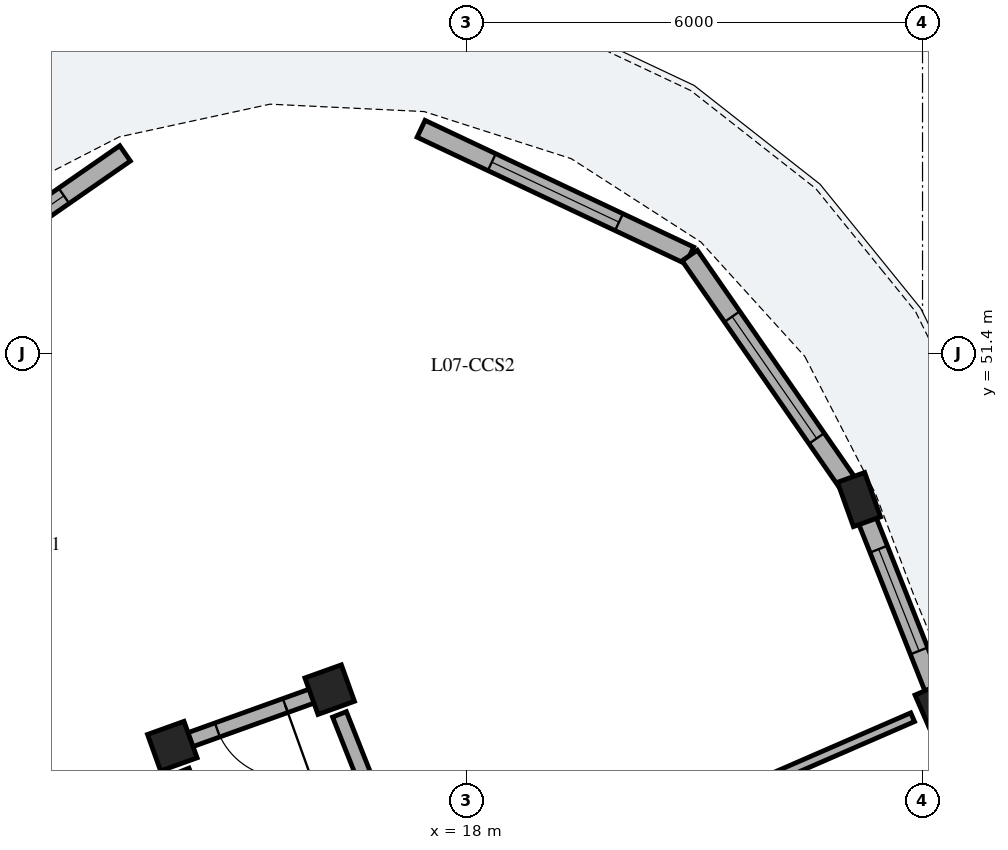
"""IFC4 building model, lengths in metres.
Left out: names, types, materials, properties, quantities, classifications, styles, units other than length and angle.
Written with IfcOpenShell. Run it as: python <this file> out.ifc"""

import sys

from ifc_helpers import new_model, si_unit, direction, frame, frame_2d, origin, origin_2d, place, context, subcontext, project, spatial, rectangle, extrude, element, fill, save


model = new_model("IFC4")
c1 = context("Model", 3, precision=1e-05, world=origin(), true_north=direction((0.0, 1.0)))
c2 = subcontext(c1, "Body", "Model", "MODEL_VIEW")
j1 = project(units=[si_unit("LENGTHUNIT", "METRE"), si_unit("PLANEANGLEUNIT", "RADIAN")], contexts=[c1])
p1 = place(None, origin())
s1 = spatial("IfcSite", under=j1, at=p1, CompositionType="ELEMENT")
p2 = place(p1, origin())
s2 = spatial("IfcBuilding", under=s1, at=p2, CompositionType="ELEMENT")
p3 = place(p2, frame((0.0, 0.0, 25.64)))
s3 = spatial("IfcBuildingStorey", under=s2, at=p3, CompositionType="ELEMENT", Elevation=25.64)
p4 = place(p3, frame((23.165, 49.479, 0.0), z_axis=(0.0, 0.0, 1.0), x_axis=(-0.941176015256, -0.337916718003, 0.0)))
e1 = element("IfcColumn", 1, at=p4, inside=s3, PredefinedType="PILASTER", context=c2, shape_type="SweptSolid", body=[
    extrude(rectangle(XDim=0.38, YDim=0.62, at=origin_2d()), origin(), (0.0, 0.0, 1.0), 3.11),
])
for number, where, z_axis, x_axis in (
    (2, (16.2, 46.979, 0.0), (0.0, 0.0, 1.0), (-0.941, -0.338, 0.0)),
    (3, (14.129, 46.236, 0.0), (0.0, 0.0, 1.0), (-0.941, -0.338, 0.0)),
    (4, (24.237, 46.776, 0.0), (0.0, 0.0, 1.0), (-0.917, -0.399, 0.0)),
):
    element("IfcColumn", number, at=place(p3, frame(where, z_axis=z_axis, x_axis=x_axis)), inside=s3, PredefinedType="COLUMN", context=c2, shape_type="SweptSolid", body=[
        extrude(rectangle(XDim=0.51, YDim=0.51, at=origin_2d()), origin(), (0.0, 0.0, 1.0), 3.11),
    ])
p5 = place(p3, frame((23.224, 49.331, 0.0), z_axis=(0.0, 0.0, 1.0), x_axis=(0.368586804501, -0.929593334501, 0.0)))
e5 = element("IfcWall", 5, at=p5, inside=s3, PredefinedType="SOLIDWALL", context=c2, shape_type="SweptSolid", body=[
    extrude(rectangle(XDim=2.524, YDim=0.245, at=frame_2d((1.262, 0.0))), origin(), (0.0, 0.0, 1.0), 2.355),
])
p6 = place(p5, frame((0.542, 0.0, 0.35)))
e6 = element("IfcOpeningElement", 6, at=p6, cuts=e5, PredefinedType="OPENING", context=c2, shape_type="SweptSolid", body=[
    extrude(rectangle(XDim=1.44, YDim=1.66, at=frame_2d((0.72, 0.83))), frame((0.0, 0.133, 0.0), z_axis=(0.0, -1.0, 0.0), x_axis=(1.0, 0.0, 0.0)), (0.0, 0.0, 1.0), 0.265),
])
p7 = place(p3, frame((10.296, 51.807, 0.0), z_axis=(0.0, 0.0, 1.0), x_axis=(0.821663343994, 0.569973112644, 0.0)))
e7 = element("IfcWall", 7, at=p7, inside=s3, PredefinedType="SOLIDWALL", context=c2, shape_type="SweptSolid", body=[
    extrude(rectangle(XDim=3.908, YDim=0.245, at=frame_2d((1.954, 0.0))), origin(), (0.0, 0.0, 1.0), 2.355),
])
p8 = place(p7, frame((0.979, 0.0, 0.4)))
e8 = element("IfcOpeningElement", 8, at=p8, cuts=e7, PredefinedType="OPENING", context=c2, shape_type="SweptSolid", body=[
    extrude(rectangle(XDim=1.95, YDim=1.78, at=frame_2d((0.975, 0.89))), frame((0.0, 0.133, 0.0), z_axis=(0.0, -1.0, 0.0), x_axis=(1.0, 0.0, 0.0)), (0.0, 0.0, 1.0), 0.265),
])
p9 = place(p3, frame((17.402, 54.358, 0.0), z_axis=(0.0, 0.0, 1.0), x_axis=(0.904437504678, -0.426606141694, 0.0)))
e9 = element("IfcWall", 9, at=p9, inside=s3, PredefinedType="SOLIDWALL", context=c2, shape_type="SweptSolid", body=[
    extrude(rectangle(XDim=3.908, YDim=0.245, at=frame_2d((1.954, 0.0))), origin(), (0.0, 0.0, 1.0), 2.355),
])
p10 = place(p9, frame((1.029, 0.0, 0.4)))
e10 = element("IfcOpeningElement", 10, at=p10, cuts=e9, PredefinedType="OPENING", context=c2, shape_type="SweptSolid", body=[
    extrude(rectangle(XDim=1.85, YDim=1.72, at=frame_2d((0.925, 0.86))), frame((0.0, 0.133, 0.0), z_axis=(0.0, -1.0, 0.0), x_axis=(1.0, 0.0, 0.0)), (0.0, 0.0, 1.0), 0.265),
])
p11 = place(p3, frame((20.937, 52.691, 0.0), z_axis=(0.0, 0.0, 1.0), x_axis=(0.570015285568, -0.82163408779, 0.0)))
e11 = element("IfcWall", 11, at=p11, inside=s3, PredefinedType="SOLIDWALL", context=c2, shape_type="SweptSolid", body=[
    extrude(rectangle(XDim=3.908, YDim=0.245, at=frame_2d((1.954, 0.0))), origin(), (0.0, 0.0, 1.0), 2.355),
])
p12 = place(p11, frame((0.979, 0.0, 0.4)))
e12 = element("IfcOpeningElement", 12, at=p12, cuts=e11, PredefinedType="OPENING", context=c2, shape_type="SweptSolid", body=[
    extrude(rectangle(XDim=1.95, YDim=1.78, at=frame_2d((0.975, 0.89))), frame((0.0, 0.133, 0.0), z_axis=(0.0, -1.0, 0.0), x_axis=(1.0, 0.0, 0.0)), (0.0, 0.0, 1.0), 0.265),
])
p13 = place(p3, frame((14.258, 45.91, 0.0), z_axis=(0.0, 0.0, 1.0), x_axis=(0.368584691693, -0.929594172233, 0.0)))
e13 = element("IfcWall", 13, at=p13, inside=s3, PredefinedType="PARTITIONING", context=c2, shape_type="SweptSolid", body=[
    extrude(rectangle(XDim=2.837, YDim=0.195, at=frame_2d((1.418, 0.0))), origin(), (0.0, 0.0, 1.0), 2.37),
])
p14 = place(p13, frame((0.944, 0.0, 0.0)))
e14 = element("IfcOpeningElement", 14, at=p14, cuts=e13, PredefinedType="OPENING", context=c2, shape_type="SweptSolid", body=[
    extrude(rectangle(XDim=0.95, YDim=2.13, at=frame_2d((0.475, 1.065))), frame((0.0, 0.107, 0.0), z_axis=(0.0, -1.0, 0.0), x_axis=(1.0, 0.0, 0.0)), (0.0, 0.0, 1.0), 0.215),
])
p15 = place(p3, frame((16.329, 46.654, 0.0), z_axis=(0.0, 0.0, 1.0), x_axis=(0.368528468945, -0.929616462622, 0.0)))
e15 = element("IfcWall", 15, at=p15, inside=s3, PredefinedType="PARTITIONING", context=c2, shape_type="SweptSolid", body=[
    extrude(rectangle(XDim=2.693, YDim=0.195, at=frame_2d((1.346, 0.0))), origin(), (0.0, 0.0, 1.0), 2.37),
])
p16 = place(p15, frame((0.872, 0.0, 0.0)))
e16 = element("IfcOpeningElement", 16, at=p16, cuts=e15, PredefinedType="OPENING", context=c2, shape_type="SweptSolid", body=[
    extrude(rectangle(XDim=0.95, YDim=2.13, at=frame_2d((0.475, 1.065))), frame((0.0, 0.107, 0.0), z_axis=(0.0, -1.0, 0.0), x_axis=(1.0, 0.0, 0.0)), (0.0, 0.0, 1.0), 0.215),
])
p17 = place(p3, frame((23.87, 46.616, 0.0), z_axis=(0.0, 0.0, 1.0), x_axis=(-0.9170582943, -0.398753162817, 0.0)))
e17 = element("IfcWall", 17, at=p17, inside=s3, PredefinedType="PARTITIONING", context=c2, shape_type="SweptSolid", body=[
    extrude(rectangle(XDim=6.6, YDim=0.125, at=frame_2d((3.3, 0.0))), origin(), (0.0, 0.0, 1.0), 2.37),
])
p18 = place(p17, frame((2.845, 0.0, 0.0)))
e18 = element("IfcOpeningElement", 18, at=p18, cuts=e17, PredefinedType="OPENING", context=c2, shape_type="SweptSolid", body=[
    extrude(rectangle(XDim=0.91, YDim=2.1, at=frame_2d((0.455, 1.05))), frame((0.0, 0.073, 0.0), z_axis=(0.0, -1.0, 0.0), x_axis=(1.0, 0.0, 0.0)), (0.0, 0.0, 1.0), 0.145),
])
p19 = place(p3, frame((16.153, 46.962, 0.0), z_axis=(0.0, 0.0, 1.0), x_axis=(-0.941167179085, -0.337941327767, 0.0)))
e19 = element("IfcWall", 19, at=p19, inside=s3, PredefinedType="PARTITIONING", context=c2, shape_type="SweptSolid", body=[
    extrude(rectangle(XDim=2.1, YDim=0.195, at=frame_2d((1.05, 0.0))), origin(), (0.0, 0.0, 1.0), 2.37),
])
p20 = place(p19, frame((0.57, 0.0, 0.0)))
e20 = element("IfcOpeningElement", 20, at=p20, cuts=e19, PredefinedType="OPENING", context=c2, shape_type="SweptSolid", body=[
    extrude(rectangle(XDim=0.95, YDim=2.13, at=frame_2d((0.475, 1.065))), frame((0.0, 0.107, 0.0), z_axis=(0.0, -1.0, 0.0), x_axis=(1.0, 0.0, 0.0)), (0.0, 0.0, 1.0), 0.215),
])
p21 = place(p6, origin())
e21 = element("IfcWindow", 21, at=p21, inside=s3, PartitioningType="SINGLE_PANEL", PredefinedType="WINDOW", context=c2, shape_type="SweptSolid", body=[
    extrude(rectangle(XDim=1.44, YDim=1.66, at=frame_2d((0.72, 0.83))), frame((0.0, 0.03, 0.0), z_axis=(0.0, -1.0, 0.0), x_axis=(1.0, 0.0, 0.0)), (0.0, 0.0, 1.0), 0.06),
])
fill(e6, e21)
p22 = place(p8, origin())
e22 = element("IfcWindow", 22, at=p22, inside=s3, PartitioningType="SINGLE_PANEL", PredefinedType="WINDOW", context=c2, shape_type="SweptSolid", body=[
    extrude(rectangle(XDim=1.95, YDim=1.78, at=frame_2d((0.975, 0.89))), frame((0.0, 0.03, 0.0), z_axis=(0.0, -1.0, 0.0), x_axis=(1.0, 0.0, 0.0)), (0.0, 0.0, 1.0), 0.06),
])
fill(e8, e22)
p23 = place(p10, origin())
e23 = element("IfcWindow", 23, at=p23, inside=s3, PartitioningType="SINGLE_PANEL", PredefinedType="WINDOW", context=c2, shape_type="SweptSolid", body=[
    extrude(rectangle(XDim=1.85, YDim=1.72, at=frame_2d((0.925, 0.86))), frame((0.0, 0.03, 0.0), z_axis=(0.0, -1.0, 0.0), x_axis=(1.0, 0.0, 0.0)), (0.0, 0.0, 1.0), 0.06),
])
fill(e10, e23)
p24 = place(p12, origin())
e24 = element("IfcWindow", 24, at=p24, inside=s3, PartitioningType="SINGLE_PANEL", PredefinedType="WINDOW", context=c2, shape_type="SweptSolid", body=[
    extrude(rectangle(XDim=1.95, YDim=1.78, at=frame_2d((0.975, 0.89))), frame((0.0, 0.03, 0.0), z_axis=(0.0, -1.0, 0.0), x_axis=(1.0, 0.0, 0.0)), (0.0, 0.0, 1.0), 0.06),
])
fill(e12, e24)
p25 = place(p20, origin())
e25 = element("IfcDoor", 25, at=p25, inside=s3, OperationType="SINGLE_SWING_LEFT", PredefinedType="DOOR", context=c2, shape_type="SweptSolid", body=[
    extrude(rectangle(XDim=0.95, YDim=2.13, at=frame_2d((0.475, 1.065))), frame((0.0, 0.025, 0.0), z_axis=(0.0, -1.0, 0.0), x_axis=(1.0, 0.0, 0.0)), (0.0, 0.0, 1.0), 0.05),
])
fill(e20, e25)
save(model, sys.argv[1])
